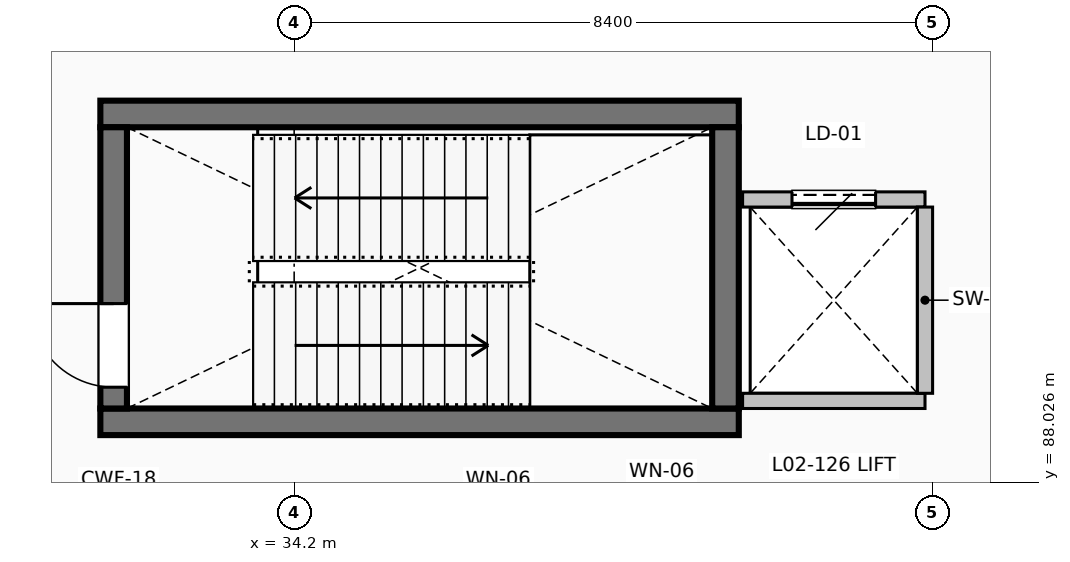
"""IFC4 building model, lengths in metres.
Left out: names, types, materials, properties, quantities, classifications, styles, units other than length and angle.
Written with IfcOpenShell. Run it as: python <this file> out.ifc"""

import sys

from ifc_helpers import new_model, si_unit, direction, frame, frame_2d, origin, place, context, subcontext, project, spatial, rectangle, extrude, element, fill, save


model = new_model("IFC4")
c1 = context("Model", 3, precision=1e-05, world=origin(), true_north=direction((0.0, 1.0)))
c2 = subcontext(c1, "Body", "Model", "MODEL_VIEW")
j1 = project(units=[si_unit("LENGTHUNIT", "METRE"), si_unit("PLANEANGLEUNIT", "RADIAN")], contexts=[c1])
p1 = place(None, origin())
s1 = spatial("IfcSite", under=j1, at=p1, CompositionType="ELEMENT")
p2 = place(p1, origin())
s2 = spatial("IfcBuilding", under=s1, at=p2, CompositionType="ELEMENT")
p3 = place(p2, frame((0.0, 0.0, 10.2)))
s3 = spatial("IfcBuildingStorey", under=s2, at=p3, CompositionType="ELEMENT", Elevation=10.2)
for number, where, z_axis, x_axis in (
    (1, (31.65, 88.825, 0.0), (0.0, 0.0, 1.0), (1.0, 0.0, 0.0)),
    (2, (40.05, 92.875, 0.0), (0.0, 0.0, 1.0), (-1.0, 0.0, 0.0)),
):
    element("IfcWall", number, at=place(p3, frame(where, z_axis=z_axis, x_axis=x_axis)), inside=s3, PredefinedType="SHEAR", context=c2, shape_type="SweptSolid", body=[
        extrude(rectangle(XDim=8.4, YDim=0.35, at=frame_2d((4.2, 0.0))), origin(), (0.0, 0.0, 1.0), 4.5),
    ])
p4 = place(p3, frame((31.825, 89.0, 0.0), z_axis=(0.0, 0.0, 1.0), x_axis=(0.0, 1.0, 0.0)))
e3 = element("IfcWall", 3, at=p4, inside=s3, PredefinedType="SHEAR", context=c2, shape_type="SweptSolid", body=[
    extrude(rectangle(XDim=3.7, YDim=0.35, at=frame_2d((1.85, 0.0))), origin(), (0.0, 0.0, 1.0), 4.5),
])
p5 = place(p4, frame((0.28, 0.0, 0.0)))
e4 = element("IfcOpeningElement", 4, at=p5, cuts=e3, PredefinedType="OPENING", context=c2, shape_type="SweptSolid", body=[
    extrude(rectangle(XDim=1.1, YDim=2.08, at=frame_2d((0.55, 1.04))), frame((0.0, 0.185, 0.0), z_axis=(0.0, -1.0, 0.0), x_axis=(1.0, 0.0, 0.0)), (0.0, 0.0, 1.0), 0.37),
])
p6 = place(p3, frame((39.875, 92.7, 0.0), z_axis=(0.0, 0.0, 1.0), x_axis=(0.0, -1.0, 0.0)))
e5 = element("IfcWall", 5, at=p6, inside=s3, PredefinedType="SHEAR", context=c2, shape_type="SweptSolid", body=[
    extrude(rectangle(XDim=3.7, YDim=0.35, at=frame_2d((1.85, 0.0))), origin(), (0.0, 0.0, 1.0), 4.5),
])
p7 = place(p3, frame((40.1, 89.1, 0.0), z_axis=(0.0, 0.0, 1.0), x_axis=(1.0, 0.0, 0.0)))
e6 = element("IfcWall", 6, at=p7, inside=s3, PredefinedType="PARTITIONING", context=c2, shape_type="SweptSolid", body=[
    extrude(rectangle(XDim=2.4, YDim=0.2, at=frame_2d((1.2, 0.0))), origin(), (0.0, 0.0, 1.0), 4.492),
])
p8 = place(p3, frame((42.5, 91.75, 0.0), z_axis=(0.0, 0.0, 1.0), x_axis=(-1.0, 0.0, 0.0)))
e7 = element("IfcWall", 7, at=p8, inside=s3, PredefinedType="PARTITIONING", context=c2, shape_type="SweptSolid", body=[
    extrude(rectangle(XDim=2.4, YDim=0.2, at=frame_2d((1.2, 0.0))), origin(), (0.0, 0.0, 1.0), 4.492),
])
p9 = place(p8, frame((0.65, 0.0, 0.0)))
e8 = element("IfcOpeningElement", 8, at=p9, cuts=e7, PredefinedType="OPENING", context=c2, shape_type="SweptSolid", body=[
    extrude(rectangle(XDim=1.1, YDim=2.15, at=frame_2d((0.55, 1.075))), frame((0.0, 0.11, 0.0), z_axis=(0.0, -1.0, 0.0), x_axis=(1.0, 0.0, 0.0)), (0.0, 0.0, 1.0), 0.22),
])
p10 = place(p3, frame((42.5, 91.65, 0.0), z_axis=(0.0, 0.0, 1.0), x_axis=(0.0, -1.0, 0.0)))
e9 = element("IfcWall", 9, at=p10, inside=s3, PredefinedType="PARTITIONING", context=c2, shape_type="SweptSolid", body=[
    extrude(rectangle(XDim=2.45, YDim=0.2, at=frame_2d((1.225, 0.0))), origin(), (0.0, 0.0, 1.0), 3.592),
])
p11 = place(p5, origin())
e10 = element("IfcDoor", 10, at=p11, inside=s3, OperationType="SINGLE_SWING_RIGHT", PredefinedType="DOOR", context=c2, shape_type="SweptSolid", body=[
    extrude(rectangle(XDim=1.1, YDim=2.08, at=frame_2d((0.55, 1.04))), frame((0.0, 0.025, 0.0), z_axis=(0.0, -1.0, 0.0), x_axis=(1.0, 0.0, 0.0)), (0.0, 0.0, 1.0), 0.05),
])
fill(e4, e10)
p12 = place(p9, origin())
e11 = element("IfcDoor", 11, at=p12, inside=s3, OperationType="SLIDING_TO_LEFT", PredefinedType="DOOR", context=c2, shape_type="SweptSolid", body=[
    extrude(rectangle(XDim=1.1, YDim=2.15, at=frame_2d((0.55, 1.075))), frame((0.0, 0.025, 0.0), z_axis=(0.0, -1.0, 0.0), x_axis=(1.0, 0.0, 0.0)), (0.0, 0.0, 1.0), 0.05),
])
fill(e8, e11)
save(model, sys.argv[1])
